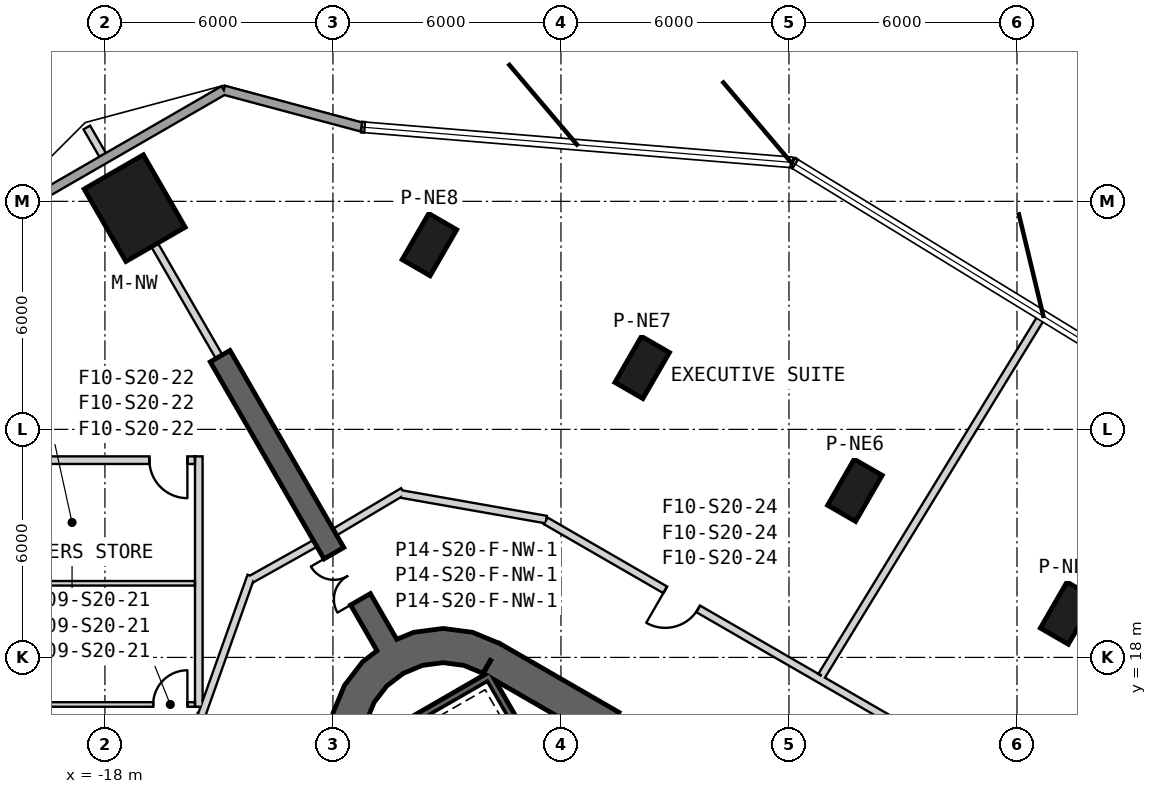
"""IFC4 building model, lengths in metres.
Left out: names, types, materials, properties, quantities, classifications, styles, units other than length and angle.
Written with IfcOpenShell. Run it as: python <this file> out.ifc"""

import sys

from ifc_helpers import new_model, si_unit, direction, frame, frame_2d, origin, origin_2d, place, context, subcontext, project, spatial, polyline, rectangle, outline, extrude, element, fill, save


model = new_model("IFC4")
c1 = context("Model", 3, precision=1e-05, world=origin(), true_north=direction((0.0, 1.0)))
c2 = subcontext(c1, "Body", "Model", "MODEL_VIEW")
j1 = project(units=[si_unit("LENGTHUNIT", "METRE"), si_unit("PLANEANGLEUNIT", "RADIAN")], contexts=[c1])
p1 = place(None, origin())
s1 = spatial("IfcSite", under=j1, at=p1, CompositionType="ELEMENT")
p2 = place(p1, origin())
s2 = spatial("IfcBuilding", under=s1, at=p2, CompositionType="ELEMENT")
p3 = place(p2, frame((0.0, 0.0, 322.1)))
s3 = spatial("IfcBuildingStorey", under=s2, at=p3, CompositionType="ELEMENT", Elevation=322.1)
p4 = place(p3, frame((-17.218, 29.822, 0.0), z_axis=(0.0, 0.0, 1.0), x_axis=(-0.5, 0.866025403784, 0.0)))
e1 = element("IfcColumn", 1, at=p4, inside=s3, PredefinedType="COLUMN", context=c2, shape_type="SweptSolid", body=[
    extrude(rectangle(XDim=2.2, YDim=1.8, at=origin_2d()), origin(), (0.0, 0.0, 1.0), 3.9),
])
for number, where, z_axis, x_axis in (
    (2, (7.333, 19.165, 0.0), (0.0, 0.0, 1.0), (0.5, 0.866, 0.0)),
    (3, (1.735, 22.397, 0.0), (0.0, 0.0, 1.0), (0.5, 0.866, 0.0)),
    (4, (-3.863, 25.629, 0.0), (0.0, 0.0, 1.0), (0.5, 0.866, 0.0)),
    (5, (-9.461, 28.861, 0.0), (0.0, 0.0, 1.0), (0.5, 0.866, 0.0)),
):
    element("IfcColumn", number, at=place(p3, frame(where, z_axis=z_axis, x_axis=x_axis)), inside=s3, PredefinedType="COLUMN", context=c2, shape_type="SweptSolid", body=[
        extrude(rectangle(XDim=1.4, YDim=0.85, at=origin_2d()), origin(), (0.0, 0.0, 1.0), 3.9),
    ])
p5 = place(p3, frame((19.475, 2.208, 0.0), z_axis=(0.0, 0.0, 1.0), x_axis=(-0.866028369851, 0.499994862586, 0.0)))
e6 = element("IfcWall", 6, at=p5, inside=s3, PredefinedType="SHEAR", context=c2, shape_type="SweptSolid", body=[
    extrude(rectangle(XDim=31.523, YDim=0.9, at=frame_2d((15.762, 0.0))), origin(), (0.0, 0.0, 1.0), 3.9),
])
p6 = place(p5, frame((7.062, 0.0, 0.0)))
e7 = element("IfcOpeningElement", 7, at=p6, cuts=e6, PredefinedType="OPENING", context=c2, shape_type="SweptSolid", body=[
    extrude(rectangle(XDim=1.2, YDim=2.4, at=frame_2d((0.6, 1.2))), frame((0.0, 0.46, 0.0), z_axis=(0.0, -1.0, 0.0), x_axis=(1.0, 0.0, 0.0)), (0.0, 0.0, 1.0), 0.92),
])
p7 = place(p5, frame((3.612, 0.0, 0.0)))
e8 = element("IfcOpeningElement", 8, at=p7, cuts=e6, PredefinedType="OPENING", context=c2, shape_type="SweptSolid", body=[
    extrude(rectangle(XDim=1.2, YDim=2.4, at=frame_2d((0.6, 1.2))), frame((0.0, 0.46, 0.0), z_axis=(0.0, -1.0, 0.0), x_axis=(1.0, 0.0, 0.0)), (0.0, 0.0, 1.0), 0.92),
])
p8 = place(p5, frame((26.712, 0.0, 0.0)))
e9 = element("IfcOpeningElement", 9, at=p8, cuts=e6, PredefinedType="OPENING", context=c2, shape_type="SweptSolid", body=[
    extrude(rectangle(XDim=1.2, YDim=2.4, at=frame_2d((0.6, 1.2))), frame((0.0, 0.46, 0.0), z_axis=(0.0, -1.0, 0.0), x_axis=(1.0, 0.0, 0.0)), (0.0, 0.0, 1.0), 0.92),
])
p9 = place(p3, origin())
e10 = element("IfcWall", 10, at=p9, inside=s3, PredefinedType="SHEAR", context=c2, shape_type="SweptSolid", body=[
    extrude(outline(polyline([(-7.6, 18.36), (-8.323, 18.659), (-9.1, 18.762), (-9.876, 18.659), (-10.6, 18.36), (-11.221, 17.883), (-11.698, 17.262), (-11.998, 16.538), (-12.1, 15.762), (-11.2, 15.762), (-11.128, 16.305), (-10.919, 16.812), (-10.585, 17.247), (-10.15, 17.58), (-9.644, 17.79), (-9.1, 17.862), (-8.556, 17.79), (-8.05, 17.58), (-7.6, 18.36)])), origin(), (0.0, 0.0, 1.0), 3.9),
])
p10 = place(p3, frame((-10.575, 18.316, 0.0), z_axis=(0.0, 0.0, 1.0), x_axis=(-0.499987805019, 0.866032444446, 0.0)))
e11 = element("IfcWall", 11, at=p10, inside=s3, PredefinedType="SHEAR", context=c2, shape_type="SweptSolid", body=[
    extrude(rectangle(XDim=8.787, YDim=0.6, at=frame_2d((4.394, 0.0))), origin(), (0.0, 0.0, 1.0), 3.9),
])
p11 = place(p10, frame((1.4, 0.0, 0.0)))
e12 = element("IfcOpeningElement", 12, at=p11, cuts=e11, PredefinedType="OPENING", context=c2, shape_type="SweptSolid", body=[
    extrude(rectangle(XDim=1.4, YDim=2.4, at=frame_2d((0.7, 1.2))), frame((0.0, 0.31, 0.0), z_axis=(0.0, -1.0, 0.0), x_axis=(1.0, 0.0, 0.0)), (0.0, 0.0, 1.0), 0.62),
])
p12 = place(p3, frame((-11.246, 31.955, 0.0), z_axis=(0.0, 0.0, 1.0), x_axis=(-0.965926566302, 0.258816283321, 0.0)))
e13 = element("IfcWall", 13, at=p12, inside=s3, PredefinedType="SOLIDWALL", context=c2, shape_type="SweptSolid", body=[
    extrude(rectangle(XDim=3.753, YDim=0.24, at=frame_2d((1.877, 0.0))), origin(), (0.0, 0.0, 1.0), 3.6),
])
p13 = place(p3, frame((-14.871, 32.926, 0.0), z_axis=(0.0, 0.0, 1.0), x_axis=(-0.866029611329, -0.499992712247, 0.0)))
e14 = element("IfcWall", 14, at=p13, inside=s3, PredefinedType="SOLIDWALL", context=c2, shape_type="SweptSolid", body=[
    extrude(rectangle(XDim=7.168, YDim=0.24, at=frame_2d((3.584, 0.0))), origin(), (0.0, 0.0, 1.0), 3.6),
])
p14 = place(p3, frame((-7.818, 17.541, -0.3), z_axis=(0.0, 0.0, 1.0), x_axis=(-0.866044365799, -0.499967155389, 0.0)))
e15 = element("IfcWall", 15, at=p14, inside=s3, PredefinedType="SHEAR", context=c2, shape_type="SweptSolid", body=[
    extrude(rectangle(XDim=3.8, YDim=0.2, at=frame_2d((1.9, 0.0))), origin(), (0.0, 0.0, 1.0), 3.9),
])
p15 = place(p3, frame((-7.854, 17.405, -0.3), z_axis=(0.0, 0.0, 1.0), x_axis=(0.499997992926, -0.866026562566, 0.0)))
e16 = element("IfcWall", 16, at=p15, inside=s3, PredefinedType="SHEAR", context=c2, shape_type="SweptSolid", body=[
    extrude(rectangle(XDim=7.9, YDim=0.2, at=frame_2d((3.95, 0.0))), origin(), (0.0, 0.0, 1.0), 3.9),
])
p16 = place(p3, frame((-15.5, 16.538, 0.0), z_axis=(0.0, 0.0, 1.0), x_axis=(0.0, -1.0, 0.0)))
e17 = element("IfcWall", 17, at=p16, inside=s3, PredefinedType="PARTITIONING", context=c2, shape_type="SweptSolid", body=[
    extrude(rectangle(XDim=6.408, YDim=0.12, at=frame_2d((3.204, 0.0))), origin(), (0.0, 0.0, 1.0), 2.97),
])
p17 = place(p16, frame((4.146, 0.0, 0.0)))
e18 = element("IfcOpeningElement", 18, at=p17, cuts=e17, PredefinedType="OPENING", context=c2, shape_type="SweptSolid", body=[
    extrude(rectangle(XDim=0.9, YDim=2.1, at=frame_2d((0.45, 1.05))), frame((0.0, 0.07, 0.0), z_axis=(0.0, -1.0, 0.0), x_axis=(1.0, 0.0, 0.0)), (0.0, 0.0, 1.0), 0.14),
])
p18 = place(p16, frame((0.99, 0.0, 0.0)))
e19 = element("IfcOpeningElement", 19, at=p18, cuts=e17, PredefinedType="OPENING", context=c2, shape_type="SweptSolid", body=[
    extrude(rectangle(XDim=0.9, YDim=2.1, at=frame_2d((0.45, 1.05))), frame((0.0, 0.07, 0.0), z_axis=(0.0, -1.0, 0.0), x_axis=(1.0, 0.0, 0.0)), (0.0, 0.0, 1.0), 0.14),
])
p19 = place(p3, frame((-14.154, 20.142, 0.0), z_axis=(0.0, 0.0, 1.0), x_axis=(-0.335013345564, -0.94221338257, 0.0)))
e20 = element("IfcWall", 20, at=p19, inside=s3, PredefinedType="PARTITIONING", context=c2, shape_type="SweptSolid", body=[
    extrude(rectangle(XDim=3.929, YDim=0.2, at=frame_2d((1.964, 0.0))), origin(), (0.0, 0.0, 1.0), 2.88),
])
p20 = place(p3, frame((-12.47, 20.999, 0.0), z_axis=(0.0, 0.0, 1.0), x_axis=(-0.87250601595, -0.488603368932, 0.0)))
e21 = element("IfcWall", 21, at=p20, inside=s3, PredefinedType="PARTITIONING", context=c2, shape_type="SweptSolid", body=[
    extrude(rectangle(XDim=1.924, YDim=0.2, at=frame_2d((0.962, 0.0))), origin(), (0.0, 0.0, 1.0), 3.6),
])
p21 = place(p3, frame((-10.155, 22.367, 0.0), z_axis=(0.0, 0.0, 1.0), x_axis=(-0.859343009577, -0.511399640097, 0.0)))
e22 = element("IfcWall", 22, at=p21, inside=s3, PredefinedType="PARTITIONING", context=c2, shape_type="SweptSolid", body=[
    extrude(rectangle(XDim=2.09, YDim=0.2, at=frame_2d((1.045, 0.0))), origin(), (0.0, 0.0, 1.0), 3.6),
])
p22 = place(p3, frame((-6.389, 21.626, 0.0), z_axis=(0.0, 0.0, 1.0), x_axis=(-0.984802578286, 0.173677522442, 0.0)))
e23 = element("IfcWall", 23, at=p22, inside=s3, PredefinedType="PARTITIONING", context=c2, shape_type="SweptSolid", body=[
    extrude(rectangle(XDim=3.875, YDim=0.2, at=frame_2d((1.938, 0.0))), origin(), (0.0, 0.0, 1.0), 2.88),
])
p23 = place(p3, frame((22.074, 5.153, 0.0), z_axis=(0.0, 0.0, 1.0), x_axis=(-0.866023485483, 0.500003322581, 0.0)))
e24 = element("IfcWall", 24, at=p23, inside=s3, PredefinedType="PARTITIONING", context=c2, shape_type="SweptSolid", body=[
    extrude(rectangle(XDim=32.881, YDim=0.2, at=frame_2d((16.44, 0.0))), origin(), (0.0, 0.0, 1.0), 2.97),
])
p24 = place(p23, frame((28.249, 0.0, 0.0)))
e25 = element("IfcOpeningElement", 25, at=p24, cuts=e24, PredefinedType="OPENING", context=c2, shape_type="SweptSolid", body=[
    extrude(rectangle(XDim=1.0, YDim=2.1, at=frame_2d((0.5, 1.05))), frame((0.0, 0.11, 0.0), z_axis=(0.0, -1.0, 0.0), x_axis=(1.0, 0.0, 0.0)), (0.0, 0.0, 1.0), 0.22),
])
p25 = place(p23, frame((16.387, 0.0, 0.0)))
e26 = element("IfcOpeningElement", 26, at=p25, cuts=e24, PredefinedType="OPENING", context=c2, shape_type="SweptSolid", body=[
    extrude(rectangle(XDim=1.0, YDim=2.1, at=frame_2d((0.5, 1.05))), frame((0.0, 0.11, 0.0), z_axis=(0.0, -1.0, 0.0), x_axis=(1.0, 0.0, 0.0)), (0.0, 0.0, 1.0), 0.22),
])
p26 = place(p23, frame((4.128, 0.0, 0.0)))
e27 = element("IfcOpeningElement", 27, at=p26, cuts=e24, PredefinedType="OPENING", context=c2, shape_type="SweptSolid", body=[
    extrude(rectangle(XDim=1.0, YDim=2.1, at=frame_2d((0.5, 1.05))), frame((0.0, 0.11, 0.0), z_axis=(0.0, -1.0, 0.0), x_axis=(1.0, 0.0, 0.0)), (0.0, 0.0, 1.0), 0.22),
])
p27 = place(p3, frame((-14.995, 25.911, 0.0), z_axis=(0.0, 0.0, 1.0), x_axis=(-0.500010627009, 0.866019268191, 0.0)))
e28 = element("IfcWall", 28, at=p27, inside=s3, PredefinedType="PARTITIONING", context=c2, shape_type="SweptSolid", body=[
    extrude(rectangle(XDim=3.398, YDim=0.2, at=frame_2d((1.699, 0.0))), origin(), (0.0, 0.0, 1.0), 3.17),
])
p28 = place(p3, frame((-18.061, 31.223, 0.0), z_axis=(0.0, 0.0, 1.0), x_axis=(-0.499798627271, 0.866141635172, 0.0)))
e29 = element("IfcWall", 29, at=p28, inside=s3, PredefinedType="PARTITIONING", context=c2, shape_type="SweptSolid", body=[
    extrude(rectangle(XDim=0.832, YDim=0.2, at=frame_2d((0.416, 0.0))), origin(), (0.0, 0.0, 1.0), 3.6),
])
p29 = place(p3, frame((-15.53, 16.702, 0.0), z_axis=(0.0, 0.0, 1.0), x_axis=(0.0, 1.0, 0.0)))
e30 = element("IfcWall", 30, at=p29, inside=s3, PredefinedType="PARTITIONING", context=c2, shape_type="SweptSolid", body=[
    extrude(rectangle(XDim=3.249, YDim=0.2, at=frame_2d((1.624, 0.0))), origin(), (0.0, 0.0, 1.0), 2.88),
])
p30 = place(p3, frame((-15.53, 19.95, 0.0), z_axis=(0.0, 0.0, 1.0), x_axis=(0.0, 1.0, 0.0)))
e31 = element("IfcWall", 31, at=p30, inside=s3, PredefinedType="PARTITIONING", context=c2, shape_type="SweptSolid", body=[
    extrude(rectangle(XDim=3.34, YDim=0.2, at=frame_2d((1.67, 0.0))), origin(), (0.0, 0.0, 1.0), 3.6),
])
p31 = place(p3, frame((-15.63, 23.19, 0.0), z_axis=(0.0, 0.0, 1.0), x_axis=(-1.0, 0.0, 0.0)))
e32 = element("IfcWall", 32, at=p31, inside=s3, PredefinedType="PARTITIONING", context=c2, shape_type="SweptSolid", body=[
    extrude(rectangle(XDim=6.67, YDim=0.2, at=frame_2d((3.335, 0.0))), origin(), (0.0, 0.0, 1.0), 3.6),
])
p32 = place(p31, frame((0.2, 0.0, 0.0)))
e33 = element("IfcOpeningElement", 33, at=p32, cuts=e32, PredefinedType="OPENING", context=c2, shape_type="SweptSolid", body=[
    extrude(rectangle(XDim=1.0, YDim=2.1, at=frame_2d((0.5, 1.05))), frame((0.0, 0.11, 0.0), z_axis=(0.0, -1.0, 0.0), x_axis=(1.0, 0.0, 0.0)), (0.0, 0.0, 1.0), 0.22),
])
p33 = place(p3, frame((0.86, 17.517, 0.0), z_axis=(0.0, 0.0, 1.0), x_axis=(0.5223859344, 0.852709174069, 0.0)))
e34 = element("IfcWall", 34, at=p33, inside=s3, PredefinedType="PARTITIONING", context=c2, shape_type="SweptSolid", body=[
    extrude(rectangle(XDim=11.117, YDim=0.2, at=frame_2d((5.559, 0.0))), origin(), (0.0, 0.0, 1.0), 2.97),
])
p34 = place(p3, frame((-22.1, 16.762, 0.0), z_axis=(0.0, 0.0, 1.0), x_axis=(1.0, 0.0, 0.0)))
e35 = element("IfcWall", 35, at=p34, inside=s3, PredefinedType="PARTITIONING", context=c2, shape_type="SweptSolid", body=[
    extrude(rectangle(XDim=6.47, YDim=0.12, at=frame_2d((3.235, 0.0))), origin(), (0.0, 0.0, 1.0), 3.6),
])
p35 = place(p34, frame((5.37, 0.0, 0.0)))
e36 = element("IfcOpeningElement", 36, at=p35, cuts=e35, PredefinedType="OPENING", context=c2, shape_type="SweptSolid", body=[
    extrude(rectangle(XDim=0.9, YDim=2.1, at=frame_2d((0.45, 1.05))), frame((0.0, 0.07, 0.0), z_axis=(0.0, -1.0, 0.0), x_axis=(1.0, 0.0, 0.0)), (0.0, 0.0, 1.0), 0.14),
])
p36 = place(p3, frame((-22.1, 19.95, 0.0), z_axis=(0.0, 0.0, 1.0), x_axis=(1.0, 0.0, 0.0)))
e37 = element("IfcWall", 37, at=p36, inside=s3, PredefinedType="PARTITIONING", context=c2, shape_type="SweptSolid", body=[
    extrude(rectangle(XDim=6.47, YDim=0.12, at=frame_2d((3.235, 0.0))), origin(), (0.0, 0.0, 1.0), 2.88),
])
p37 = place(p35, origin())
e38 = element("IfcDoor", 38, at=p37, inside=s3, OperationType="SINGLE_SWING_RIGHT", PredefinedType="NOTDEFINED", context=c2, shape_type="SweptSolid", body=[
    extrude(rectangle(XDim=0.9, YDim=2.1, at=frame_2d((0.45, 1.05))), frame((0.0, 0.025, 0.0), z_axis=(0.0, -1.0, 0.0), x_axis=(1.0, 0.0, 0.0)), (0.0, 0.0, 1.0), 0.05),
])
fill(e36, e38)
p38 = place(p32, origin())
e39 = element("IfcDoor", 39, at=p38, inside=s3, OperationType="SINGLE_SWING_LEFT", PredefinedType="USERDEFINED", context=c2, shape_type="SweptSolid", body=[
    extrude(rectangle(XDim=1.0, YDim=2.1, at=frame_2d((0.5, 1.05))), frame((0.0, 0.025, 0.0), z_axis=(0.0, -1.0, 0.0), x_axis=(1.0, 0.0, 0.0)), (0.0, 0.0, 1.0), 0.05),
])
fill(e33, e39)
p39 = place(p24, origin())
e40 = element("IfcDoor", 40, at=p39, inside=s3, OperationType="SINGLE_SWING_RIGHT", PredefinedType="USERDEFINED", context=c2, shape_type="SweptSolid", body=[
    extrude(rectangle(XDim=1.0, YDim=2.1, at=frame_2d((0.5, 1.05))), frame((0.0, 0.025, 0.0), z_axis=(0.0, -1.0, 0.0), x_axis=(1.0, 0.0, 0.0)), (0.0, 0.0, 1.0), 0.05),
])
fill(e25, e40)
p40 = place(p11, origin())
e41 = element("IfcDoor", 41, at=p40, inside=s3, OperationType="DOUBLE_DOOR_SINGLE_SWING", PredefinedType="NOTDEFINED", context=c2, shape_type="SweptSolid", body=[
    extrude(rectangle(XDim=1.4, YDim=2.4, at=frame_2d((0.7, 1.2))), frame((0.0, 0.025, 0.0), z_axis=(0.0, -1.0, 0.0), x_axis=(1.0, 0.0, 0.0)), (0.0, 0.0, 1.0), 0.05),
])
fill(e12, e41)
save(model, sys.argv[1])
